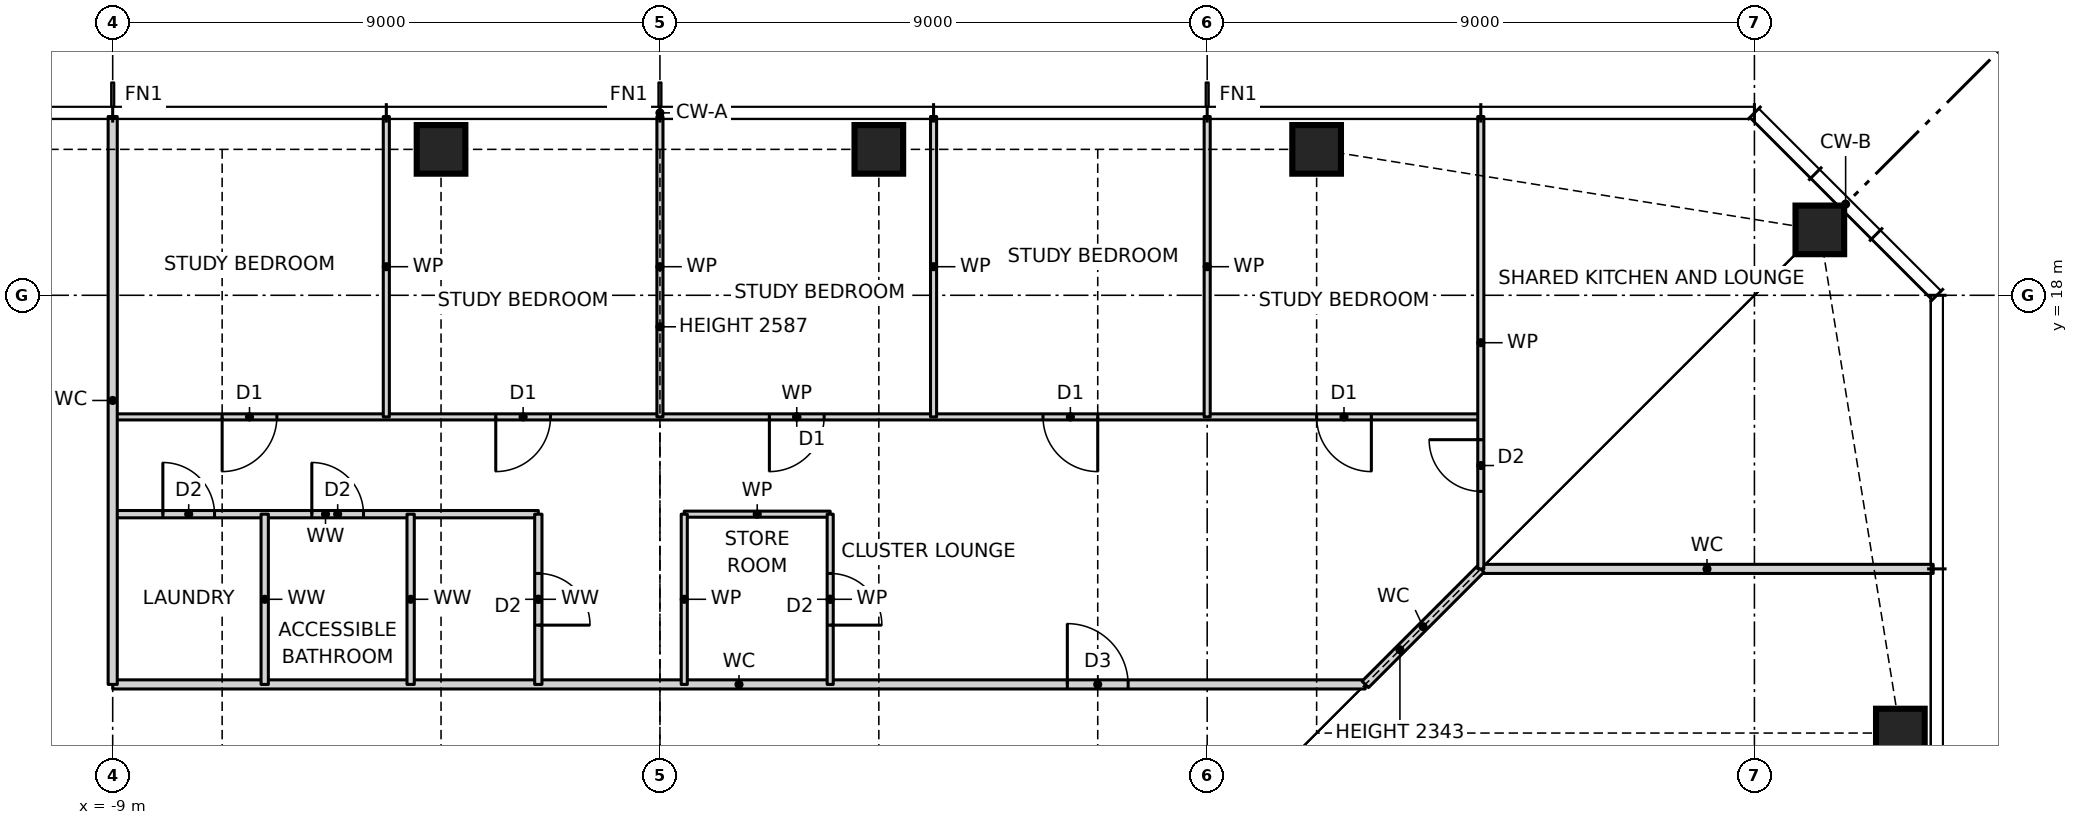
"""IFC4 building model, lengths in metres.
Left out: names, types, materials, properties, quantities, classifications, styles, units other than length and angle.
Written with IfcOpenShell. Run it as: python <this file> out.ifc"""

import sys

from ifc_helpers import new_model, si_unit, direction, frame, frame_2d, origin, origin_2d, place, context, subcontext, project, spatial, rectangle, hollow_rectangle, extrude, element, fill, save


model = new_model("IFC4")
c1 = context("Model", 3, precision=1e-05, world=origin(), true_north=direction((0.0, 1.0)))
c2 = subcontext(c1, "Body", "Model", "MODEL_VIEW")
j1 = project(units=[si_unit("LENGTHUNIT", "METRE"), si_unit("PLANEANGLEUNIT", "RADIAN")], contexts=[c1])
p1 = place(None, origin())
s1 = spatial("IfcSite", under=j1, at=p1, CompositionType="ELEMENT")
p2 = place(p1, origin())
s2 = spatial("IfcBuilding", under=s1, at=p2, CompositionType="ELEMENT")
p3 = place(p2, frame((0.0, 0.0, 84.0)))
s3 = spatial("IfcBuildingStorey", under=s2, at=p3, CompositionType="ELEMENT", Elevation=84.0)
for number, where, z_axis, x_axis in (
    (1, (20.4, 10.8, 0.0), (0.0, 0.0, 1.0), (1.0, 0.0, 0.0)),
    (2, (19.076, 19.076, 0.0), (0.0, 0.0, 1.0), (1.0, 0.0, 0.0)),
    (3, (10.8, 20.4, 0.0), (0.0, 0.0, 1.0), (1.0, 0.0, 0.0)),
    (4, (3.6, 20.4, 0.0), (0.0, 0.0, 1.0), (1.0, 0.0, 0.0)),
    (5, (-3.6, 20.4, 0.0), (0.0, 0.0, 1.0), (1.0, 0.0, 0.0)),
):
    element("IfcColumn", number, at=place(p3, frame(where, z_axis=z_axis, x_axis=x_axis)), inside=s3, PredefinedType="COLUMN", context=c2, shape_type="SweptSolid", body=[
        extrude(hollow_rectangle(XDim=0.8, YDim=0.8, WallThickness=0.07, at=origin_2d()), origin(), (0.0, 0.0, 1.0), 3.5),
    ])
p4 = place(p3, frame((-9.0, 11.6, 0.0), z_axis=(0.0, 0.0, 1.0), x_axis=(1.0, 0.0, 0.0)))
e6 = element("IfcWall", 6, at=p4, inside=s3, PredefinedType="PARTITIONING", context=c2, shape_type="SweptSolid", body=[
    extrude(rectangle(XDim=20.6, YDim=0.15, at=frame_2d((10.3, 0.0))), origin(), (0.0, 0.0, 1.0), 3.27),
])
p5 = place(p4, frame((15.7, 0.0, 0.0)))
e7 = element("IfcOpeningElement", 7, at=p5, cuts=e6, PredefinedType="OPENING", context=c2, shape_type="SweptSolid", body=[
    extrude(rectangle(XDim=1.0, YDim=2.1, at=frame_2d((0.5, 1.05))), frame((0.0, 0.085, 0.0), z_axis=(0.0, -1.0, 0.0), x_axis=(1.0, 0.0, 0.0)), (0.0, 0.0, 1.0), 0.17),
])
p6 = place(p3, frame((13.5, 13.5, 0.0), z_axis=(0.0, 0.0, 1.0), x_axis=(1.0, 0.0, 0.0)))
e8 = element("IfcWall", 8, at=p6, inside=s3, PredefinedType="PARTITIONING", context=c2, shape_type="SweptSolid", body=[
    extrude(rectangle(XDim=7.44, YDim=0.15, at=frame_2d((3.72, 0.0))), origin(), (0.0, 0.0, 1.0), 3.27),
])
p7 = place(p3, frame((-9.0, 14.4, 0.0), z_axis=(0.0, 0.0, 1.0), x_axis=(1.0, 0.0, 0.0)))
e9 = element("IfcWall", 9, at=p7, inside=s3, PredefinedType="PARTITIONING", context=c2, shape_type="SweptSolid", body=[
    extrude(rectangle(XDim=7.0, YDim=0.12, at=frame_2d((3.5, 0.0))), origin(), (0.0, 0.0, 1.0), 3.27),
])
p8 = place(p7, frame((3.275, 0.0, 0.0)))
e10 = element("IfcOpeningElement", 10, at=p8, cuts=e9, PredefinedType="OPENING", context=c2, shape_type="SweptSolid", body=[
    extrude(rectangle(XDim=0.85, YDim=2.1, at=frame_2d((0.425, 1.05))), frame((0.0, 0.07, 0.0), z_axis=(0.0, -1.0, 0.0), x_axis=(1.0, 0.0, 0.0)), (0.0, 0.0, 1.0), 0.14),
])
p9 = place(p7, frame((0.825, 0.0, 0.0)))
e11 = element("IfcOpeningElement", 11, at=p9, cuts=e9, PredefinedType="OPENING", context=c2, shape_type="SweptSolid", body=[
    extrude(rectangle(XDim=0.85, YDim=2.1, at=frame_2d((0.425, 1.05))), frame((0.0, 0.07, 0.0), z_axis=(0.0, -1.0, 0.0), x_axis=(1.0, 0.0, 0.0)), (0.0, 0.0, 1.0), 0.14),
])
p10 = place(p3, frame((0.4, 14.4, 0.0), z_axis=(0.0, 0.0, 1.0), x_axis=(1.0, 0.0, 0.0)))
e12 = element("IfcWall", 12, at=p10, inside=s3, PredefinedType="PARTITIONING", context=c2, shape_type="SweptSolid", body=[
    extrude(rectangle(XDim=2.4, YDim=0.1, at=frame_2d((1.2, 0.0))), origin(), (0.0, 0.0, 1.0), 3.27),
])
p11 = place(p3, frame((-9.0, 16.0, 0.0), z_axis=(0.0, 0.0, 1.0), x_axis=(1.0, 0.0, 0.0)))
e13 = element("IfcWall", 13, at=p11, inside=s3, PredefinedType="PARTITIONING", context=c2, shape_type="SweptSolid", body=[
    extrude(rectangle(XDim=22.5, YDim=0.1, at=frame_2d((11.25, 0.0))), origin(), (0.0, 0.0, 1.0), 3.27),
])
p12 = place(p11, frame((19.8, 0.0, 0.0)))
e14 = element("IfcOpeningElement", 14, at=p12, cuts=e13, PredefinedType="OPENING", context=c2, shape_type="SweptSolid", body=[
    extrude(rectangle(XDim=0.9, YDim=2.1, at=frame_2d((0.45, 1.05))), frame((0.0, 0.06, 0.0), z_axis=(0.0, -1.0, 0.0), x_axis=(1.0, 0.0, 0.0)), (0.0, 0.0, 1.0), 0.12),
])
p13 = place(p11, frame((15.3, 0.0, 0.0)))
e15 = element("IfcOpeningElement", 15, at=p13, cuts=e13, PredefinedType="OPENING", context=c2, shape_type="SweptSolid", body=[
    extrude(rectangle(XDim=0.9, YDim=2.1, at=frame_2d((0.45, 1.05))), frame((0.0, 0.06, 0.0), z_axis=(0.0, -1.0, 0.0), x_axis=(1.0, 0.0, 0.0)), (0.0, 0.0, 1.0), 0.12),
])
p14 = place(p11, frame((10.8, 0.0, 0.0)))
e16 = element("IfcOpeningElement", 16, at=p14, cuts=e13, PredefinedType="OPENING", context=c2, shape_type="SweptSolid", body=[
    extrude(rectangle(XDim=0.9, YDim=2.1, at=frame_2d((0.45, 1.05))), frame((0.0, 0.06, 0.0), z_axis=(0.0, -1.0, 0.0), x_axis=(1.0, 0.0, 0.0)), (0.0, 0.0, 1.0), 0.12),
])
p15 = place(p11, frame((6.3, 0.0, 0.0)))
e17 = element("IfcOpeningElement", 17, at=p15, cuts=e13, PredefinedType="OPENING", context=c2, shape_type="SweptSolid", body=[
    extrude(rectangle(XDim=0.9, YDim=2.1, at=frame_2d((0.45, 1.05))), frame((0.0, 0.06, 0.0), z_axis=(0.0, -1.0, 0.0), x_axis=(1.0, 0.0, 0.0)), (0.0, 0.0, 1.0), 0.12),
])
p16 = place(p11, frame((1.8, 0.0, 0.0)))
e18 = element("IfcOpeningElement", 18, at=p16, cuts=e13, PredefinedType="OPENING", context=c2, shape_type="SweptSolid", body=[
    extrude(rectangle(XDim=0.9, YDim=2.1, at=frame_2d((0.45, 1.05))), frame((0.0, 0.06, 0.0), z_axis=(0.0, -1.0, 0.0), x_axis=(1.0, 0.0, 0.0)), (0.0, 0.0, 1.0), 0.12),
])
p17 = place(p3, frame((11.6, 11.6, 0.0), z_axis=(0.0, 0.0, 1.0), x_axis=(0.707106781187, 0.707106781187, 0.0)))
e19 = element("IfcWall", 19, at=p17, inside=s3, PredefinedType="PARTITIONING", context=c2, shape_type="SweptSolid", body=[
    extrude(rectangle(XDim=2.687, YDim=0.15, at=frame_2d((1.343, 0.0))), origin(), (0.0, 0.0, 1.0), 2.343),
])
p18 = place(p3, frame((13.5, 13.5, 0.0), z_axis=(0.0, 0.0, 1.0), x_axis=(0.0, 1.0, 0.0)))
e20 = element("IfcWall", 20, at=p18, inside=s3, PredefinedType="PARTITIONING", context=c2, shape_type="SweptSolid", body=[
    extrude(rectangle(XDim=7.44, YDim=0.1, at=frame_2d((3.72, 0.0))), origin(), (0.0, 0.0, 1.0), 3.27),
])
p19 = place(p18, frame((1.275, 0.0, 0.0)))
e21 = element("IfcOpeningElement", 21, at=p19, cuts=e20, PredefinedType="OPENING", context=c2, shape_type="SweptSolid", body=[
    extrude(rectangle(XDim=0.85, YDim=2.1, at=frame_2d((0.425, 1.05))), frame((0.0, 0.06, 0.0), z_axis=(0.0, -1.0, 0.0), x_axis=(1.0, 0.0, 0.0)), (0.0, 0.0, 1.0), 0.12),
])
for number, where, z_axis, x_axis in (
    (22, (9.0, 16.0, 0.0), (0.0, 0.0, 1.0), (0.0, 1.0, 0.0)),
    (23, (4.5, 16.0, 0.0), (0.0, 0.0, 1.0), (0.0, 1.0, 0.0)),
):
    element("IfcWall", number, at=place(p3, frame(where, z_axis=z_axis, x_axis=x_axis)), inside=s3, PredefinedType="PARTITIONING", context=c2, shape_type="SweptSolid", body=[
        extrude(rectangle(XDim=4.94, YDim=0.1, at=frame_2d((2.47, 0.0))), origin(), (0.0, 0.0, 1.0), 3.27),
    ])
p20 = place(p3, frame((2.8, 11.6, 0.0), z_axis=(0.0, 0.0, 1.0), x_axis=(0.0, 1.0, 0.0)))
e24 = element("IfcWall", 24, at=p20, inside=s3, PredefinedType="PARTITIONING", context=c2, shape_type="SweptSolid", body=[
    extrude(rectangle(XDim=2.8, YDim=0.1, at=frame_2d((1.4, 0.0))), origin(), (0.0, 0.0, 1.0), 3.27),
])
p21 = place(p20, frame((0.975, 0.0, 0.0)))
e25 = element("IfcOpeningElement", 25, at=p21, cuts=e24, PredefinedType="OPENING", context=c2, shape_type="SweptSolid", body=[
    extrude(rectangle(XDim=0.85, YDim=2.1, at=frame_2d((0.425, 1.05))), frame((0.0, 0.06, 0.0), z_axis=(0.0, -1.0, 0.0), x_axis=(1.0, 0.0, 0.0)), (0.0, 0.0, 1.0), 0.12),
])
p22 = place(p3, frame((0.4, 11.6, 0.0), z_axis=(0.0, 0.0, 1.0), x_axis=(0.0, 1.0, 0.0)))
e26 = element("IfcWall", 26, at=p22, inside=s3, PredefinedType="PARTITIONING", context=c2, shape_type="SweptSolid", body=[
    extrude(rectangle(XDim=2.8, YDim=0.1, at=frame_2d((1.4, 0.0))), origin(), (0.0, 0.0, 1.0), 3.27),
])
p23 = place(p3, frame((0.0, 16.0, 0.0), z_axis=(0.0, 0.0, 1.0), x_axis=(0.0, 1.0, 0.0)))
e27 = element("IfcWall", 27, at=p23, inside=s3, PredefinedType="PARTITIONING", context=c2, shape_type="SweptSolid", body=[
    extrude(rectangle(XDim=4.94, YDim=0.1, at=frame_2d((2.47, 0.0))), origin(), (0.0, 0.0, 1.0), 2.587),
])
p24 = place(p3, frame((-2.0, 11.6, 0.0), z_axis=(0.0, 0.0, 1.0), x_axis=(0.0, 1.0, 0.0)))
e28 = element("IfcWall", 28, at=p24, inside=s3, PredefinedType="PARTITIONING", context=c2, shape_type="SweptSolid", body=[
    extrude(rectangle(XDim=2.8, YDim=0.12, at=frame_2d((1.4, 0.0))), origin(), (0.0, 0.0, 1.0), 3.27),
])
p25 = place(p24, frame((0.975, 0.0, 0.0)))
e29 = element("IfcOpeningElement", 29, at=p25, cuts=e28, PredefinedType="OPENING", context=c2, shape_type="SweptSolid", body=[
    extrude(rectangle(XDim=0.85, YDim=2.1, at=frame_2d((0.425, 1.05))), frame((0.0, 0.07, 0.0), z_axis=(0.0, -1.0, 0.0), x_axis=(1.0, 0.0, 0.0)), (0.0, 0.0, 1.0), 0.14),
])
p26 = place(p3, frame((-4.1, 11.6, 0.0), z_axis=(0.0, 0.0, 1.0), x_axis=(0.0, 1.0, 0.0)))
e30 = element("IfcWall", 30, at=p26, inside=s3, PredefinedType="PARTITIONING", context=c2, shape_type="SweptSolid", body=[
    extrude(rectangle(XDim=2.8, YDim=0.12, at=frame_2d((1.4, 0.0))), origin(), (0.0, 0.0, 1.0), 3.27),
])
p27 = place(p3, frame((-4.5, 16.0, 0.0), z_axis=(0.0, 0.0, 1.0), x_axis=(0.0, 1.0, 0.0)))
e31 = element("IfcWall", 31, at=p27, inside=s3, PredefinedType="PARTITIONING", context=c2, shape_type="SweptSolid", body=[
    extrude(rectangle(XDim=4.94, YDim=0.1, at=frame_2d((2.47, 0.0))), origin(), (0.0, 0.0, 1.0), 3.27),
])
p28 = place(p3, frame((-6.5, 11.6, 0.0), z_axis=(0.0, 0.0, 1.0), x_axis=(0.0, 1.0, 0.0)))
e32 = element("IfcWall", 32, at=p28, inside=s3, PredefinedType="PARTITIONING", context=c2, shape_type="SweptSolid", body=[
    extrude(rectangle(XDim=2.8, YDim=0.12, at=frame_2d((1.4, 0.0))), origin(), (0.0, 0.0, 1.0), 3.27),
])
p29 = place(p3, frame((-9.0, 11.6, 0.0), z_axis=(0.0, 0.0, 1.0), x_axis=(0.0, 1.0, 0.0)))
e33 = element("IfcWall", 33, at=p29, inside=s3, PredefinedType="PARTITIONING", context=c2, shape_type="SweptSolid", body=[
    extrude(rectangle(XDim=9.34, YDim=0.15, at=frame_2d((4.67, 0.0))), origin(), (0.0, 0.0, 1.0), 3.27),
])
p30 = place(p12, frame((0.9, 0.0, 0.0), z_axis=(0.0, 0.0, 1.0), x_axis=(-1.0, 0.0, 0.0)))
e34 = element("IfcDoor", 34, at=p30, inside=s3, OperationType="SINGLE_SWING_LEFT", PredefinedType="DOOR", context=c2, shape_type="SweptSolid", body=[
    extrude(rectangle(XDim=0.9, YDim=2.1, at=frame_2d((0.45, 1.05))), frame((0.0, 0.025, 0.0), z_axis=(0.0, -1.0, 0.0), x_axis=(1.0, 0.0, 0.0)), (0.0, 0.0, 1.0), 0.05),
])
fill(e14, e34)
p31 = place(p13, frame((0.9, 0.0, 0.0), z_axis=(0.0, 0.0, 1.0), x_axis=(-1.0, 0.0, 0.0)))
e35 = element("IfcDoor", 35, at=p31, inside=s3, OperationType="SINGLE_SWING_LEFT", PredefinedType="DOOR", context=c2, shape_type="SweptSolid", body=[
    extrude(rectangle(XDim=0.9, YDim=2.1, at=frame_2d((0.45, 1.05))), frame((0.0, 0.025, 0.0), z_axis=(0.0, -1.0, 0.0), x_axis=(1.0, 0.0, 0.0)), (0.0, 0.0, 1.0), 0.05),
])
fill(e15, e35)
p32 = place(p14, frame((0.9, 0.0, 0.0), z_axis=(0.0, 0.0, 1.0), x_axis=(-1.0, 0.0, 0.0)))
e36 = element("IfcDoor", 36, at=p32, inside=s3, OperationType="SINGLE_SWING_RIGHT", PredefinedType="DOOR", context=c2, shape_type="SweptSolid", body=[
    extrude(rectangle(XDim=0.9, YDim=2.1, at=frame_2d((0.45, 1.05))), frame((0.0, 0.025, 0.0), z_axis=(0.0, -1.0, 0.0), x_axis=(1.0, 0.0, 0.0)), (0.0, 0.0, 1.0), 0.05),
])
fill(e16, e36)
p33 = place(p15, frame((0.9, 0.0, 0.0), z_axis=(0.0, 0.0, 1.0), x_axis=(-1.0, 0.0, 0.0)))
e37 = element("IfcDoor", 37, at=p33, inside=s3, OperationType="SINGLE_SWING_RIGHT", PredefinedType="DOOR", context=c2, shape_type="SweptSolid", body=[
    extrude(rectangle(XDim=0.9, YDim=2.1, at=frame_2d((0.45, 1.05))), frame((0.0, 0.025, 0.0), z_axis=(0.0, -1.0, 0.0), x_axis=(1.0, 0.0, 0.0)), (0.0, 0.0, 1.0), 0.05),
])
fill(e17, e37)
p34 = place(p16, frame((0.9, 0.0, 0.0), z_axis=(0.0, 0.0, 1.0), x_axis=(-1.0, 0.0, 0.0)))
e38 = element("IfcDoor", 38, at=p34, inside=s3, OperationType="SINGLE_SWING_RIGHT", PredefinedType="DOOR", context=c2, shape_type="SweptSolid", body=[
    extrude(rectangle(XDim=0.9, YDim=2.1, at=frame_2d((0.45, 1.05))), frame((0.0, 0.025, 0.0), z_axis=(0.0, -1.0, 0.0), x_axis=(1.0, 0.0, 0.0)), (0.0, 0.0, 1.0), 0.05),
])
fill(e18, e38)
p35 = place(p5, origin())
e39 = element("IfcDoor", 39, at=p35, inside=s3, OperationType="SINGLE_SWING_LEFT", PredefinedType="DOOR", context=c2, shape_type="SweptSolid", body=[
    extrude(rectangle(XDim=1.0, YDim=2.1, at=frame_2d((0.5, 1.05))), frame((0.0, 0.025, 0.0), z_axis=(0.0, -1.0, 0.0), x_axis=(1.0, 0.0, 0.0)), (0.0, 0.0, 1.0), 0.05),
])
fill(e7, e39)
p36 = place(p21, frame((0.85, 0.0, 0.0), z_axis=(0.0, 0.0, 1.0), x_axis=(-1.0, 0.0, 0.0)))
e40 = element("IfcDoor", 40, at=p36, inside=s3, OperationType="SINGLE_SWING_RIGHT", PredefinedType="DOOR", context=c2, shape_type="SweptSolid", body=[
    extrude(rectangle(XDim=0.85, YDim=2.1, at=frame_2d((0.425, 1.05))), frame((0.0, 0.025, 0.0), z_axis=(0.0, -1.0, 0.0), x_axis=(1.0, 0.0, 0.0)), (0.0, 0.0, 1.0), 0.05),
])
fill(e25, e40)
p37 = place(p25, frame((0.85, 0.0, 0.0), z_axis=(0.0, 0.0, 1.0), x_axis=(-1.0, 0.0, 0.0)))
e41 = element("IfcDoor", 41, at=p37, inside=s3, OperationType="SINGLE_SWING_RIGHT", PredefinedType="DOOR", context=c2, shape_type="SweptSolid", body=[
    extrude(rectangle(XDim=0.85, YDim=2.1, at=frame_2d((0.425, 1.05))), frame((0.0, 0.025, 0.0), z_axis=(0.0, -1.0, 0.0), x_axis=(1.0, 0.0, 0.0)), (0.0, 0.0, 1.0), 0.05),
])
fill(e29, e41)
p38 = place(p8, origin())
e42 = element("IfcDoor", 42, at=p38, inside=s3, OperationType="SINGLE_SWING_LEFT", PredefinedType="DOOR", context=c2, shape_type="SweptSolid", body=[
    extrude(rectangle(XDim=0.85, YDim=2.1, at=frame_2d((0.425, 1.05))), frame((0.0, 0.025, 0.0), z_axis=(0.0, -1.0, 0.0), x_axis=(1.0, 0.0, 0.0)), (0.0, 0.0, 1.0), 0.05),
])
fill(e10, e42)
p39 = place(p9, origin())
e43 = element("IfcDoor", 43, at=p39, inside=s3, OperationType="SINGLE_SWING_LEFT", PredefinedType="DOOR", context=c2, shape_type="SweptSolid", body=[
    extrude(rectangle(XDim=0.85, YDim=2.1, at=frame_2d((0.425, 1.05))), frame((0.0, 0.025, 0.0), z_axis=(0.0, -1.0, 0.0), x_axis=(1.0, 0.0, 0.0)), (0.0, 0.0, 1.0), 0.05),
])
fill(e11, e43)
p40 = place(p19, origin())
e44 = element("IfcDoor", 44, at=p40, inside=s3, OperationType="SINGLE_SWING_RIGHT", PredefinedType="DOOR", context=c2, shape_type="SweptSolid", body=[
    extrude(rectangle(XDim=0.85, YDim=2.1, at=frame_2d((0.425, 1.05))), frame((0.0, 0.025, 0.0), z_axis=(0.0, -1.0, 0.0), x_axis=(1.0, 0.0, 0.0)), (0.0, 0.0, 1.0), 0.05),
])
fill(e21, e44)
save(model, sys.argv[1])
